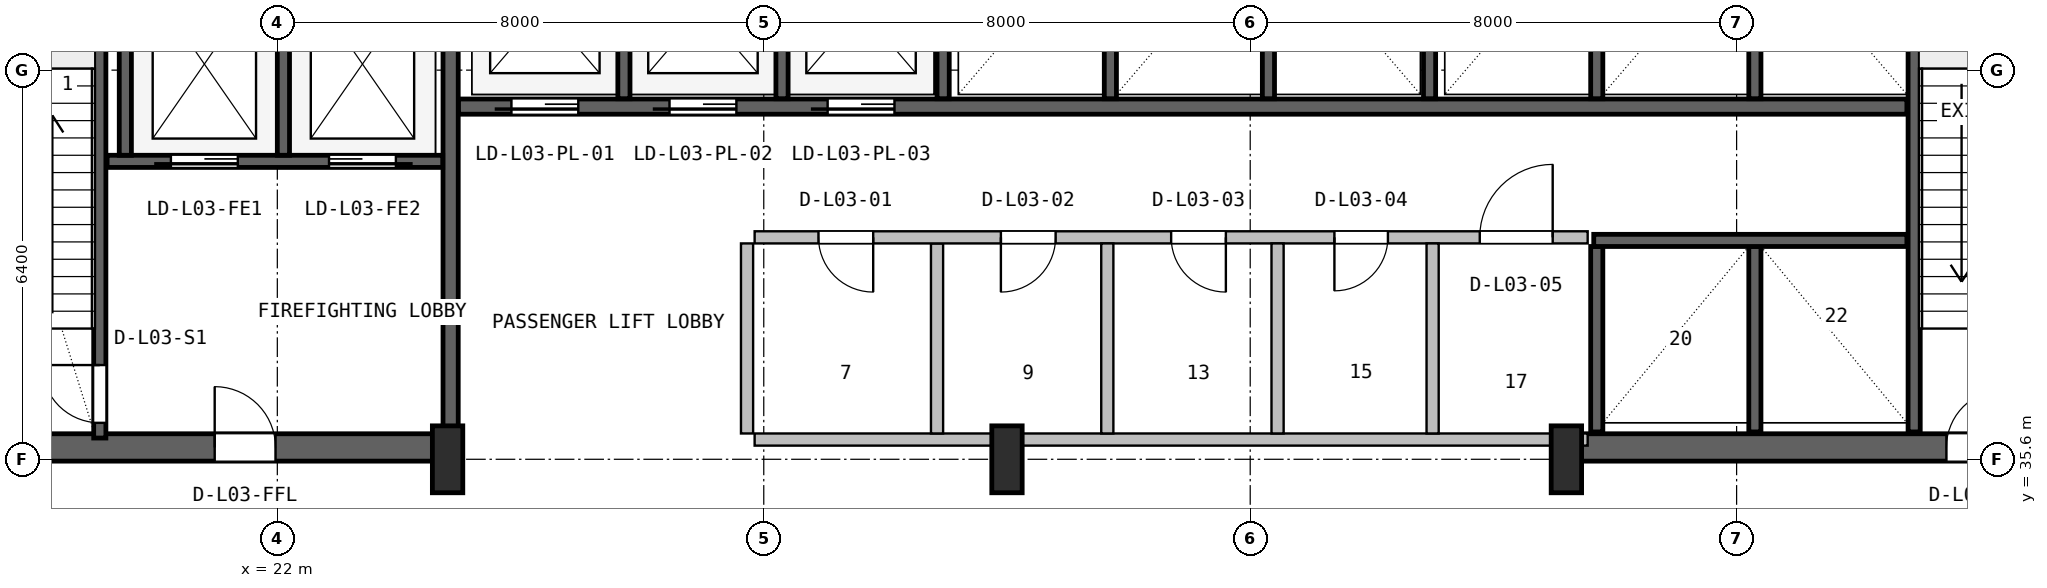
"""IFC4 building model, lengths in metres.
Left out: names, types, materials, properties, quantities, classifications, styles, units other than length and angle.
Written with IfcOpenShell. Run it as: python <this file> out.ifc"""

import sys

from ifc_helpers import new_model, si_unit, direction, frame, frame_2d, origin, origin_2d, place, context, subcontext, project, spatial, rectangle, i_section, extrude, source, transform, mapped, element, fill, save


model = new_model("IFC4")
c1 = context("Model", 3, precision=1e-05, world=origin(), true_north=direction((0.0, 1.0)))
c2 = subcontext(c1, "Body", "Model", "MODEL_VIEW")
j1 = project(units=[si_unit("LENGTHUNIT", "METRE"), si_unit("PLANEANGLEUNIT", "RADIAN")], contexts=[c1])
p1 = place(None, origin())
s1 = spatial("IfcSite", under=j1, at=p1, CompositionType="ELEMENT")
p2 = place(p1, origin())
s2 = spatial("IfcBuilding", under=s1, at=p2, CompositionType="ELEMENT")
p3 = place(p2, frame((0.0, 0.0, 16.8)))
s3 = spatial("IfcBuildingStorey", under=s2, at=p3, CompositionType="ELEMENT", Elevation=16.8)
p4 = place(p3, frame((15.57, 35.795, 0.0), z_axis=(0.0, 0.0, 1.0), x_axis=(1.0, 0.0, 0.0)))
e1 = element("IfcWall", 1, at=p4, inside=s3, PredefinedType="SHEAR", context=c2, shape_type="SweptSolid", body=[
    extrude(rectangle(XDim=9.23, YDim=0.45, at=frame_2d((4.615, 0.0))), origin(), (0.0, 0.0, 1.0), 5.08),
])
p5 = place(p4, frame((5.4, 0.0, 0.0)))
e2 = element("IfcOpeningElement", 2, at=p5, cuts=e1, PredefinedType="OPENING", context=c2, shape_type="SweptSolid", body=[
    extrude(rectangle(XDim=1.0, YDim=2.1, at=frame_2d((0.5, 1.05))), frame((0.0, 0.235, 0.0), z_axis=(0.0, -1.0, 0.0), x_axis=(1.0, 0.0, 0.0)), (0.0, 0.0, 1.0), 0.47),
])
p6 = place(p3, frame((43.2, 35.795, 0.0), z_axis=(0.0, 0.0, 1.0), x_axis=(1.0, 0.0, 0.0)))
e3 = element("IfcWall", 3, at=p6, inside=s3, PredefinedType="SHEAR", context=c2, shape_type="SweptSolid", body=[
    extrude(rectangle(XDim=9.23, YDim=0.45, at=frame_2d((4.615, 0.0))), origin(), (0.0, 0.0, 1.0), 5.08),
])
p7 = place(p6, frame((6.25, 0.0, 0.0)))
e4 = element("IfcOpeningElement", 4, at=p7, cuts=e3, PredefinedType="OPENING", context=c2, shape_type="SweptSolid", body=[
    extrude(rectangle(XDim=0.95, YDim=2.1, at=frame_2d((0.475, 1.05))), frame((0.0, 0.235, 0.0), z_axis=(0.0, -1.0, 0.0), x_axis=(1.0, 0.0, 0.0)), (0.0, 0.0, 1.0), 0.47),
])
m1 = source(origin(), c2, "Body", "SweptSolid", [
    extrude(i_section(OverallWidth=0.5, OverallDepth=1.1, WebThickness=0.018, FlangeThickness=0.032, FilletRadius=0.018, at=origin_2d()), origin(), (0.0, 0.0, 1.0), 5.4),
])
for number, where, z_axis, x_axis in (
    (5, (24.8, 35.6, 0.0), (0.0, 0.0, 1.0), (1.0, 0.0, 0.0)),
    (6, (34.0, 35.6, 0.0), (0.0, 0.0, 1.0), (1.0, 0.0, 0.0)),
    (7, (43.2, 35.6, 0.0), (0.0, 0.0, 1.0), (1.0, 0.0, 0.0)),
):
    element("IfcColumn", number, at=place(p3, frame(where, z_axis=z_axis, x_axis=x_axis)), inside=s3, PredefinedType="COLUMN", context=c2, shape_type="MappedRepresentation", body=[
        mapped(m1, transform((0.0, 0.0, 0.0), x_axis=(1.0, 0.0, 0.0), y_axis=(0.0, 1.0, 0.0), z_axis=(0.0, 0.0, 1.0), scale=1.0)),
    ])
p8 = place(p3, frame((19.08, 35.95, 0.0), z_axis=(0.0, 0.0, 1.0), x_axis=(0.0, 1.0, 0.0)))
e8 = element("IfcWall", 8, at=p8, inside=s3, PredefinedType="SHEAR", context=c2, shape_type="SweptSolid", body=[
    extrude(rectangle(XDim=9.65, YDim=0.2, at=frame_2d((4.825, 0.0))), origin(), (0.0, 0.0, 1.0), 5.08),
])
p9 = place(p8, frame((0.25, 0.0, 0.0)))
e9 = element("IfcOpeningElement", 9, at=p9, cuts=e8, PredefinedType="OPENING", context=c2, shape_type="SweptSolid", body=[
    extrude(rectangle(XDim=0.95, YDim=2.1, at=frame_2d((0.475, 1.05))), frame((0.0, 0.11, 0.0), z_axis=(0.0, -1.0, 0.0), x_axis=(1.0, 0.0, 0.0)), (0.0, 0.0, 1.0), 0.22),
])
p10 = place(p3, frame((24.85, 36.05, 0.0), z_axis=(0.0, 0.0, 1.0), x_axis=(0.0, 1.0, 0.0)))
e10 = element("IfcWall", 10, at=p10, inside=s3, PredefinedType="SHEAR", context=c2, shape_type="SweptSolid", body=[
    extrude(rectangle(XDim=10.45, YDim=0.25, at=frame_2d((5.225, 0.0))), origin(), (0.0, 0.0, 1.0), 5.08),
])
p11 = place(p3, frame((19.2, 40.5, 0.0), z_axis=(0.0, 0.0, 1.0), x_axis=(1.0, 0.0, 0.0)))
e11 = element("IfcWall", 11, at=p11, inside=s3, PredefinedType="SHEAR", context=c2, shape_type="SweptSolid", body=[
    extrude(rectangle(XDim=5.52, YDim=0.2, at=frame_2d((2.76, 0.0))), origin(), (0.0, 0.0, 1.0), 5.08),
])
p12 = place(p11, frame((1.05, 0.0, 0.0)))
e12 = element("IfcOpeningElement", 12, at=p12, cuts=e11, PredefinedType="OPENING", context=c2, shape_type="SweptSolid", body=[
    extrude(rectangle(XDim=1.1, YDim=2.18, at=frame_2d((0.55, 1.09))), frame((0.0, 0.11, 0.0), z_axis=(0.0, -1.0, 0.0), x_axis=(1.0, 0.0, 0.0)), (0.0, 0.0, 1.0), 0.22),
])
p13 = place(p11, frame((3.65, 0.0, 0.0)))
e13 = element("IfcOpeningElement", 13, at=p13, cuts=e11, PredefinedType="OPENING", context=c2, shape_type="SweptSolid", body=[
    extrude(rectangle(XDim=1.1, YDim=2.18, at=frame_2d((0.55, 1.09))), frame((0.0, 0.11, 0.0), z_axis=(0.0, -1.0, 0.0), x_axis=(1.0, 0.0, 0.0)), (0.0, 0.0, 1.0), 0.22),
])
p14 = place(p3, frame((22.1, 40.6, 0.0), z_axis=(0.0, 0.0, 1.0), x_axis=(0.0, 1.0, 0.0)))
e14 = element("IfcWall", 14, at=p14, inside=s3, PredefinedType="SHEAR", context=c2, shape_type="SweptSolid", body=[
    extrude(rectangle(XDim=3.0, YDim=0.2, at=frame_2d((1.5, 0.0))), origin(), (0.0, 0.0, 1.0), 5.08),
])
p15 = place(p3, frame((19.5, 40.6, 0.0), z_axis=(0.0, 0.0, 1.0), x_axis=(0.0, 1.0, 0.0)))
e15 = element("IfcWall", 15, at=p15, inside=s3, PredefinedType="SHEAR", context=c2, shape_type="SweptSolid", body=[
    extrude(rectangle(XDim=5.95, YDim=0.2, at=frame_2d((2.975, 0.0))), origin(), (0.0, 0.0, 1.0), 5.08),
])
p16 = place(p3, frame((48.92, 36.05, 0.0), z_axis=(0.0, 0.0, 1.0), x_axis=(0.0, 1.0, 0.0)))
e16 = element("IfcWall", 16, at=p16, inside=s3, PredefinedType="SHEAR", context=c2, shape_type="SweptSolid", body=[
    extrude(rectangle(XDim=10.5, YDim=0.2, at=frame_2d((5.25, 0.0))), origin(), (0.0, 0.0, 1.0), 5.08),
])
p17 = place(p3, frame((24.98, 41.4, 0.0), z_axis=(0.0, 0.0, 1.0), x_axis=(1.0, 0.0, 0.0)))
e17 = element("IfcWall", 17, at=p17, inside=s3, PredefinedType="SHEAR", context=c2, shape_type="SweptSolid", body=[
    extrude(rectangle(XDim=23.82, YDim=0.25, at=frame_2d((11.91, 0.0))), origin(), (0.0, 0.0, 1.0), 5.08),
])
p18 = place(p17, frame((0.87, 0.0, 0.0)))
e18 = element("IfcOpeningElement", 18, at=p18, cuts=e17, PredefinedType="OPENING", context=c2, shape_type="SweptSolid", body=[
    extrude(rectangle(XDim=1.1, YDim=2.18, at=frame_2d((0.55, 1.09))), frame((0.0, 0.135, 0.0), z_axis=(0.0, -1.0, 0.0), x_axis=(1.0, 0.0, 0.0)), (0.0, 0.0, 1.0), 0.27),
])
p19 = place(p17, frame((3.47, 0.0, 0.0)))
e19 = element("IfcOpeningElement", 19, at=p19, cuts=e17, PredefinedType="OPENING", context=c2, shape_type="SweptSolid", body=[
    extrude(rectangle(XDim=1.1, YDim=2.18, at=frame_2d((0.55, 1.09))), frame((0.0, 0.135, 0.0), z_axis=(0.0, -1.0, 0.0), x_axis=(1.0, 0.0, 0.0)), (0.0, 0.0, 1.0), 0.27),
])
p20 = place(p17, frame((6.07, 0.0, 0.0)))
e20 = element("IfcOpeningElement", 20, at=p20, cuts=e17, PredefinedType="OPENING", context=c2, shape_type="SweptSolid", body=[
    extrude(rectangle(XDim=1.1, YDim=2.18, at=frame_2d((0.55, 1.09))), frame((0.0, 0.135, 0.0), z_axis=(0.0, -1.0, 0.0), x_axis=(1.0, 0.0, 0.0)), (0.0, 0.0, 1.0), 0.27),
])
for number, where, z_axis, x_axis in (
    (21, (27.7, 41.53, 0.0), (0.0, 0.0, 1.0), (0.0, 1.0, 0.0)),
    (22, (30.3, 41.53, 0.0), (0.0, 0.0, 1.0), (0.0, 1.0, 0.0)),
):
    element("IfcWall", number, at=place(p3, frame(where, z_axis=z_axis, x_axis=x_axis)), inside=s3, PredefinedType="SHEAR", context=c2, shape_type="SweptSolid", body=[
        extrude(rectangle(XDim=2.87, YDim=0.2, at=frame_2d((1.435, 0.0))), origin(), (0.0, 0.0, 1.0), 5.08),
    ])
p21 = place(p3, frame((32.95, 41.53, 0.0), z_axis=(0.0, 0.0, 1.0), x_axis=(0.0, 1.0, 0.0)))
e23 = element("IfcWall", 23, at=p21, inside=s3, PredefinedType="SHEAR", context=c2, shape_type="SweptSolid", body=[
    extrude(rectangle(XDim=5.02, YDim=0.2, at=frame_2d((2.51, 0.0))), origin(), (0.0, 0.0, 1.0), 5.08),
])
for number, where, z_axis, x_axis in (
    (24, (35.7, 41.53, 0.0), (0.0, 0.0, 1.0), (0.0, 1.0, 0.0)),
    (25, (38.3, 41.53, 0.0), (0.0, 0.0, 1.0), (0.0, 1.0, 0.0)),
):
    element("IfcWall", number, at=place(p3, frame(where, z_axis=z_axis, x_axis=x_axis)), inside=s3, PredefinedType="SHEAR", context=c2, shape_type="SweptSolid", body=[
        extrude(rectangle(XDim=2.87, YDim=0.2, at=frame_2d((1.435, 0.0))), origin(), (0.0, 0.0, 1.0), 5.08),
    ])
p22 = place(p3, frame((40.95, 41.53, 0.0), z_axis=(0.0, 0.0, 1.0), x_axis=(0.0, 1.0, 0.0)))
e26 = element("IfcWall", 26, at=p22, inside=s3, PredefinedType="SHEAR", context=c2, shape_type="SweptSolid", body=[
    extrude(rectangle(XDim=5.02, YDim=0.2, at=frame_2d((2.51, 0.0))), origin(), (0.0, 0.0, 1.0), 5.08),
])
for number, where, z_axis, x_axis in (
    (27, (43.7, 41.53, 0.0), (0.0, 0.0, 1.0), (0.0, 1.0, 0.0)),
    (28, (46.3, 41.53, 0.0), (0.0, 0.0, 1.0), (0.0, 1.0, 0.0)),
):
    element("IfcWall", number, at=place(p3, frame(where, z_axis=z_axis, x_axis=x_axis)), inside=s3, PredefinedType="SHEAR", context=c2, shape_type="SweptSolid", body=[
        extrude(rectangle(XDim=2.87, YDim=0.2, at=frame_2d((1.435, 0.0))), origin(), (0.0, 0.0, 1.0), 5.08),
    ])
for number, where, z_axis, x_axis in (
    (29, (43.7, 36.05, 0.0), (0.0, 0.0, 1.0), (0.0, 1.0, 0.0)),
    (30, (46.3, 36.05, 0.0), (0.0, 0.0, 1.0), (0.0, 1.0, 0.0)),
):
    element("IfcWall", number, at=place(p3, frame(where, z_axis=z_axis, x_axis=x_axis)), inside=s3, PredefinedType="SHEAR", context=c2, shape_type="SweptSolid", body=[
        extrude(rectangle(XDim=3.05, YDim=0.2, at=frame_2d((1.525, 0.0))), origin(), (0.0, 0.0, 1.0), 5.08),
    ])
p23 = place(p3, frame((43.65, 39.2, 0.0), z_axis=(0.0, 0.0, 1.0), x_axis=(1.0, 0.0, 0.0)))
e31 = element("IfcWall", 31, at=p23, inside=s3, PredefinedType="SHEAR", context=c2, shape_type="SweptSolid", body=[
    extrude(rectangle(XDim=5.15, YDim=0.2, at=frame_2d((2.575, 0.0))), origin(), (0.0, 0.0, 1.0), 5.08),
])
p24 = place(p3, frame((29.85, 35.925, 0.0), z_axis=(0.0, 0.0, 1.0), x_axis=(1.0, 0.0, 0.0)))
e32 = element("IfcWall", 32, at=p24, inside=s3, PredefinedType="SOLIDWALL", context=c2, shape_type="SweptSolid", body=[
    extrude(rectangle(XDim=13.7, YDim=0.2, at=frame_2d((6.85, 0.0))), origin(), (0.0, 0.0, 1.0), 4.143),
])
p25 = place(p3, frame((32.85, 36.025, 0.0), z_axis=(0.0, 0.0, 1.0), x_axis=(0.0, 1.0, 0.0)))
e33 = element("IfcWall", 33, at=p25, inside=s3, PredefinedType="PLUMBINGWALL", context=c2, shape_type="SweptSolid", body=[
    extrude(rectangle(XDim=3.125, YDim=0.2, at=frame_2d((1.562, 0.0))), origin(), (0.0, 0.0, 1.0), 5.06),
])
p26 = place(p3, frame((29.85, 39.25, 0.0), z_axis=(0.0, 0.0, 1.0), x_axis=(1.0, 0.0, 0.0)))
e34 = element("IfcWall", 34, at=p26, inside=s3, PredefinedType="SOLIDWALL", context=c2, shape_type="SweptSolid", body=[
    extrude(rectangle(XDim=13.7, YDim=0.2, at=frame_2d((6.85, 0.0))), origin(), (0.0, 0.0, 1.0), 5.06),
])
p27 = place(p26, frame((1.05, 0.0, 0.0)))
e35 = element("IfcOpeningElement", 35, at=p27, cuts=e34, PredefinedType="OPENING", context=c2, shape_type="SweptSolid", body=[
    extrude(rectangle(XDim=0.9, YDim=2.06, at=frame_2d((0.45, 1.03))), frame((0.0, 0.11, 0.0), z_axis=(0.0, -1.0, 0.0), x_axis=(1.0, 0.0, 0.0)), (0.0, 0.0, 1.0), 0.22),
])
p28 = place(p26, frame((4.05, 0.0, 0.0)))
e36 = element("IfcOpeningElement", 36, at=p28, cuts=e34, PredefinedType="OPENING", context=c2, shape_type="SweptSolid", body=[
    extrude(rectangle(XDim=0.9, YDim=2.06, at=frame_2d((0.45, 1.03))), frame((0.0, 0.11, 0.0), z_axis=(0.0, -1.0, 0.0), x_axis=(1.0, 0.0, 0.0)), (0.0, 0.0, 1.0), 0.22),
])
p29 = place(p26, frame((6.85, 0.0, 0.0)))
e37 = element("IfcOpeningElement", 37, at=p29, cuts=e34, PredefinedType="OPENING", context=c2, shape_type="SweptSolid", body=[
    extrude(rectangle(XDim=0.9, YDim=2.06, at=frame_2d((0.45, 1.03))), frame((0.0, 0.11, 0.0), z_axis=(0.0, -1.0, 0.0), x_axis=(1.0, 0.0, 0.0)), (0.0, 0.0, 1.0), 0.22),
])
p30 = place(p26, frame((9.535, 0.0, 0.0)))
e38 = element("IfcOpeningElement", 38, at=p30, cuts=e34, PredefinedType="OPENING", context=c2, shape_type="SweptSolid", body=[
    extrude(rectangle(XDim=0.88, YDim=2.06, at=frame_2d((0.44, 1.03))), frame((0.0, 0.11, 0.0), z_axis=(0.0, -1.0, 0.0), x_axis=(1.0, 0.0, 0.0)), (0.0, 0.0, 1.0), 0.22),
])
p31 = place(p26, frame((11.925, 0.0, 0.0)))
e39 = element("IfcOpeningElement", 39, at=p31, cuts=e34, PredefinedType="OPENING", context=c2, shape_type="SweptSolid", body=[
    extrude(rectangle(XDim=1.2, YDim=2.1, at=frame_2d((0.6, 1.05))), frame((0.0, 0.11, 0.0), z_axis=(0.0, -1.0, 0.0), x_axis=(1.0, 0.0, 0.0)), (0.0, 0.0, 1.0), 0.22),
])
for number, where, z_axis, x_axis in (
    (40, (29.725, 36.025, 0.0), (0.0, 0.0, 1.0), (0.0, 1.0, 0.0)),
    (41, (35.65, 36.025, 0.0), (0.0, 0.0, 1.0), (0.0, 1.0, 0.0)),
    (42, (38.45, 36.025, 0.0), (0.0, 0.0, 1.0), (0.0, 1.0, 0.0)),
):
    element("IfcWall", number, at=place(p3, frame(where, z_axis=z_axis, x_axis=x_axis)), inside=s3, PredefinedType="PLUMBINGWALL", context=c2, shape_type="SweptSolid", body=[
        extrude(rectangle(XDim=3.125, YDim=0.2, at=frame_2d((1.562, 0.0))), origin(), (0.0, 0.0, 1.0), 5.06),
    ])
p32 = place(p3, frame((41.0, 36.025, 0.0), z_axis=(0.0, 0.0, 1.0), x_axis=(0.0, 1.0, 0.0)))
e43 = element("IfcWall", 43, at=p32, inside=s3, PredefinedType="SOLIDWALL", context=c2, shape_type="SweptSolid", body=[
    extrude(rectangle(XDim=3.125, YDim=0.2, at=frame_2d((1.562, 0.0))), origin(), (0.0, 0.0, 1.0), 5.06),
])
m2 = source(origin(), c2, "Body", "SweptSolid", [
    extrude(rectangle(XDim=0.95, YDim=2.1, at=frame_2d((0.475, 1.05))), frame((0.0, 0.025, 0.0), z_axis=(0.0, -1.0, 0.0), x_axis=(1.0, 0.0, 0.0)), (0.0, 0.0, 1.0), 0.05),
])
p33 = place(p9, origin())
e44 = element("IfcDoor", 44, at=p33, inside=s3, OperationType="SINGLE_SWING_RIGHT", PredefinedType="DOOR", context=c2, shape_type="MappedRepresentation", body=[
    mapped(m2, transform((0.0, 0.0, 0.0), x_axis=(1.0, 0.0, 0.0), y_axis=(0.0, 1.0, 0.0), z_axis=(0.0, 0.0, 1.0), scale=1.0)),
])
fill(e9, e44)
m3 = source(origin(), c2, "Body", "SweptSolid", [
    extrude(rectangle(XDim=1.0, YDim=2.1, at=frame_2d((0.5, 1.05))), frame((0.0, 0.025, 0.0), z_axis=(0.0, -1.0, 0.0), x_axis=(1.0, 0.0, 0.0)), (0.0, 0.0, 1.0), 0.05),
])
p34 = place(p5, origin())
e45 = element("IfcDoor", 45, at=p34, inside=s3, OperationType="SINGLE_SWING_LEFT", PredefinedType="DOOR", context=c2, shape_type="MappedRepresentation", body=[
    mapped(m3, transform((0.0, 0.0, 0.0), x_axis=(1.0, 0.0, 0.0), y_axis=(0.0, 1.0, 0.0), z_axis=(0.0, 0.0, 1.0), scale=1.0)),
])
fill(e2, e45)
m4 = source(origin(), c2, "Body", "SweptSolid", [
    extrude(rectangle(XDim=1.1, YDim=2.18, at=frame_2d((0.55, 1.09))), frame((0.0, 0.025, 0.0), z_axis=(0.0, -1.0, 0.0), x_axis=(1.0, 0.0, 0.0)), (0.0, 0.0, 1.0), 0.05),
])
p35 = place(p12, frame((1.1, 0.0, 0.0), z_axis=(0.0, 0.0, 1.0), x_axis=(-1.0, 0.0, 0.0)))
e46 = element("IfcDoor", 46, at=p35, inside=s3, OperationType="SLIDING_TO_LEFT", PredefinedType="DOOR", context=c2, shape_type="MappedRepresentation", body=[
    mapped(m4, transform((0.0, 0.0, 0.0), x_axis=(1.0, 0.0, 0.0), y_axis=(0.0, 1.0, 0.0), z_axis=(0.0, 0.0, 1.0), scale=1.0)),
])
fill(e12, e46)
p36 = place(p13, frame((1.1, 0.0, 0.0), z_axis=(0.0, 0.0, 1.0), x_axis=(-1.0, 0.0, 0.0)))
e47 = element("IfcDoor", 47, at=p36, inside=s3, OperationType="SLIDING_TO_RIGHT", PredefinedType="DOOR", context=c2, shape_type="MappedRepresentation", body=[
    mapped(m4, transform((0.0, 0.0, 0.0), x_axis=(1.0, 0.0, 0.0), y_axis=(0.0, 1.0, 0.0), z_axis=(0.0, 0.0, 1.0), scale=1.0)),
])
fill(e13, e47)
p37 = place(p7, origin())
e48 = element("IfcDoor", 48, at=p37, inside=s3, OperationType="SINGLE_SWING_RIGHT", PredefinedType="DOOR", context=c2, shape_type="MappedRepresentation", body=[
    mapped(m2, transform((0.0, 0.0, 0.0), x_axis=(1.0, 0.0, 0.0), y_axis=(0.0, 1.0, 0.0), z_axis=(0.0, 0.0, 1.0), scale=1.0)),
])
fill(e4, e48)
p38 = place(p18, frame((1.1, 0.0, 0.0), z_axis=(0.0, 0.0, 1.0), x_axis=(-1.0, 0.0, 0.0)))
e49 = element("IfcDoor", 49, at=p38, inside=s3, OperationType="SLIDING_TO_LEFT", PredefinedType="DOOR", context=c2, shape_type="MappedRepresentation", body=[
    mapped(m4, transform((0.0, 0.0, 0.0), x_axis=(1.0, 0.0, 0.0), y_axis=(0.0, 1.0, 0.0), z_axis=(0.0, 0.0, 1.0), scale=1.0)),
])
fill(e18, e49)
p39 = place(p19, frame((1.1, 0.0, 0.0), z_axis=(0.0, 0.0, 1.0), x_axis=(-1.0, 0.0, 0.0)))
e50 = element("IfcDoor", 50, at=p39, inside=s3, OperationType="SLIDING_TO_LEFT", PredefinedType="DOOR", context=c2, shape_type="MappedRepresentation", body=[
    mapped(m4, transform((0.0, 0.0, 0.0), x_axis=(1.0, 0.0, 0.0), y_axis=(0.0, 1.0, 0.0), z_axis=(0.0, 0.0, 1.0), scale=1.0)),
])
fill(e19, e50)
p40 = place(p20, frame((1.1, 0.0, 0.0), z_axis=(0.0, 0.0, 1.0), x_axis=(-1.0, 0.0, 0.0)))
e51 = element("IfcDoor", 51, at=p40, inside=s3, OperationType="SLIDING_TO_LEFT", PredefinedType="DOOR", context=c2, shape_type="MappedRepresentation", body=[
    mapped(m4, transform((0.0, 0.0, 0.0), x_axis=(1.0, 0.0, 0.0), y_axis=(0.0, 1.0, 0.0), z_axis=(0.0, 0.0, 1.0), scale=1.0)),
])
fill(e20, e51)
m5 = source(origin(), c2, "Body", "SweptSolid", [
    extrude(rectangle(XDim=0.9, YDim=2.06, at=frame_2d((0.45, 1.03))), frame((0.0, 0.025, 0.0), z_axis=(0.0, -1.0, 0.0), x_axis=(1.0, 0.0, 0.0)), (0.0, 0.0, 1.0), 0.05),
])
p41 = place(p27, frame((0.9, 0.0, 0.0), z_axis=(0.0, 0.0, 1.0), x_axis=(-1.0, 0.0, 0.0)))
e52 = element("IfcDoor", 52, at=p41, inside=s3, OperationType="SINGLE_SWING_RIGHT", PredefinedType="DOOR", context=c2, shape_type="MappedRepresentation", body=[
    mapped(m5, transform((0.0, 0.0, 0.0), x_axis=(1.0, 0.0, 0.0), y_axis=(0.0, 1.0, 0.0), z_axis=(0.0, 0.0, 1.0), scale=1.0)),
])
fill(e35, e52)
p42 = place(p28, frame((0.9, 0.0, 0.0), z_axis=(0.0, 0.0, 1.0), x_axis=(-1.0, 0.0, 0.0)))
e53 = element("IfcDoor", 53, at=p42, inside=s3, OperationType="SINGLE_SWING_LEFT", PredefinedType="DOOR", context=c2, shape_type="MappedRepresentation", body=[
    mapped(m5, transform((0.0, 0.0, 0.0), x_axis=(1.0, 0.0, 0.0), y_axis=(0.0, 1.0, 0.0), z_axis=(0.0, 0.0, 1.0), scale=1.0)),
])
fill(e36, e53)
p43 = place(p29, frame((0.9, 0.0, 0.0), z_axis=(0.0, 0.0, 1.0), x_axis=(-1.0, 0.0, 0.0)))
e54 = element("IfcDoor", 54, at=p43, inside=s3, OperationType="SINGLE_SWING_RIGHT", PredefinedType="DOOR", context=c2, shape_type="MappedRepresentation", body=[
    mapped(m5, transform((0.0, 0.0, 0.0), x_axis=(1.0, 0.0, 0.0), y_axis=(0.0, 1.0, 0.0), z_axis=(0.0, 0.0, 1.0), scale=1.0)),
])
fill(e37, e54)
m6 = source(origin(), c2, "Body", "SweptSolid", [
    extrude(rectangle(XDim=0.88, YDim=2.06, at=frame_2d((0.44, 1.03))), frame((0.0, 0.025, 0.0), z_axis=(0.0, -1.0, 0.0), x_axis=(1.0, 0.0, 0.0)), (0.0, 0.0, 1.0), 0.05),
])
p44 = place(p30, frame((0.88, 0.0, 0.0), z_axis=(0.0, 0.0, 1.0), x_axis=(-1.0, 0.0, 0.0)))
e55 = element("IfcDoor", 55, at=p44, inside=s3, OperationType="SINGLE_SWING_LEFT", PredefinedType="DOOR", context=c2, shape_type="MappedRepresentation", body=[
    mapped(m6, transform((0.0, 0.0, 0.0), x_axis=(1.0, 0.0, 0.0), y_axis=(0.0, 1.0, 0.0), z_axis=(0.0, 0.0, 1.0), scale=1.0)),
])
fill(e38, e55)
m7 = source(origin(), c2, "Body", "SweptSolid", [
    extrude(rectangle(XDim=1.2, YDim=2.1, at=frame_2d((0.6, 1.05))), frame((0.0, 0.025, 0.0), z_axis=(0.0, -1.0, 0.0), x_axis=(1.0, 0.0, 0.0)), (0.0, 0.0, 1.0), 0.05),
])
p45 = place(p31, origin())
e56 = element("IfcDoor", 56, at=p45, inside=s3, OperationType="SINGLE_SWING_RIGHT", PredefinedType="DOOR", context=c2, shape_type="MappedRepresentation", body=[
    mapped(m7, transform((0.0, 0.0, 0.0), x_axis=(1.0, 0.0, 0.0), y_axis=(0.0, 1.0, 0.0), z_axis=(0.0, 0.0, 1.0), scale=1.0)),
])
fill(e39, e56)
save(model, sys.argv[1])
